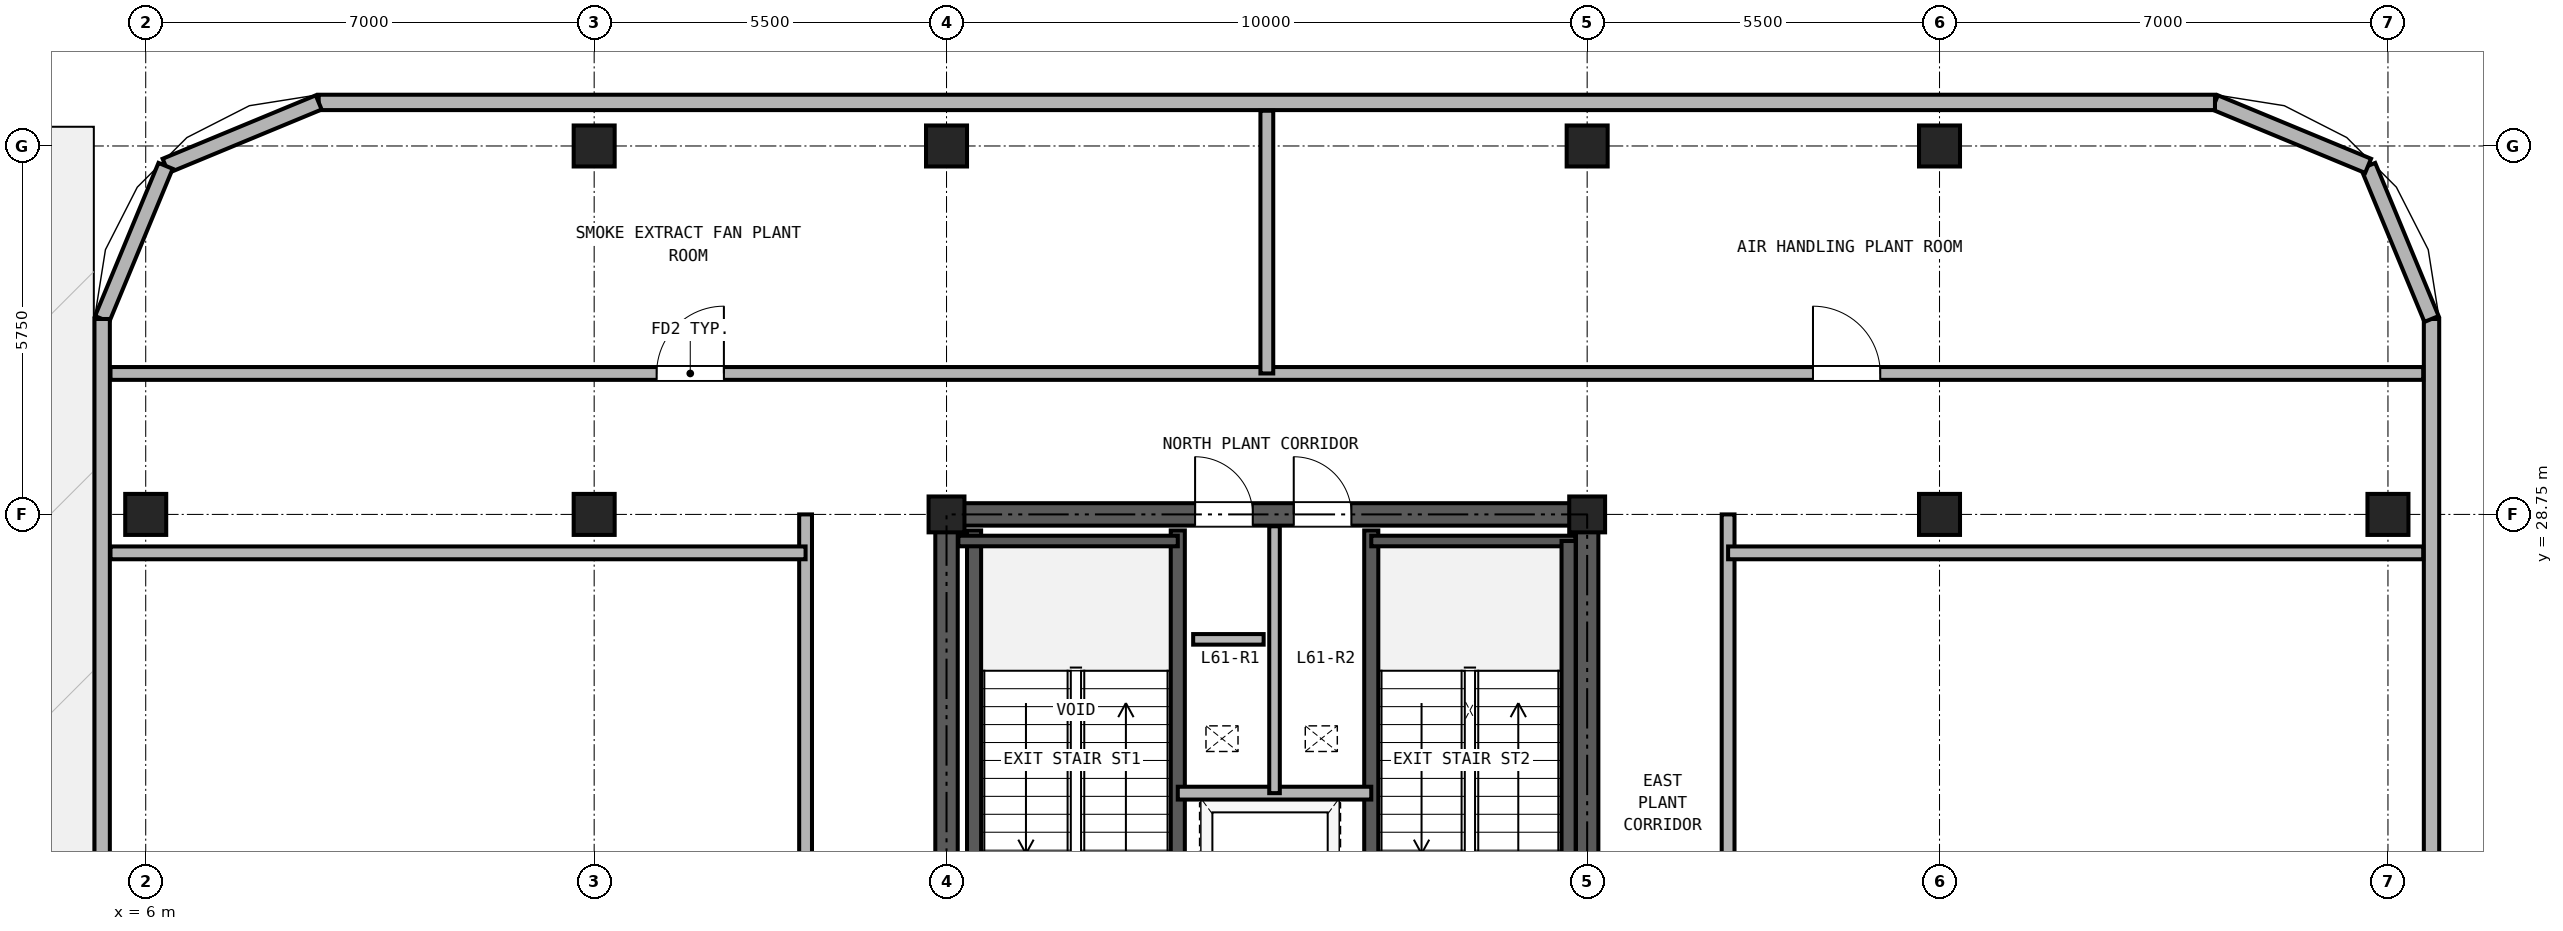
"""IFC4 building model, lengths in metres.
Left out: names, types, materials, properties, quantities, classifications, styles, units other than length and angle.
Written with IfcOpenShell. Run it as: python <this file> out.ifc"""

import sys

from ifc_helpers import new_model, si_unit, direction, frame, frame_2d, origin, origin_2d, place, context, subcontext, project, spatial, rectangle, hollow_rectangle, extrude, source, transform, mapped, element, fill, save


model = new_model("IFC4")
c1 = context("Model", 3, precision=1e-05, world=origin(), true_north=direction((0.0, 1.0)))
c2 = subcontext(c1, "Body", "Model", "MODEL_VIEW")
j1 = project(units=[si_unit("LENGTHUNIT", "METRE"), si_unit("PLANEANGLEUNIT", "RADIAN")], contexts=[c1])
p1 = place(None, origin())
s1 = spatial("IfcSite", under=j1, at=p1, CompositionType="ELEMENT")
p2 = place(p1, origin())
s2 = spatial("IfcBuilding", under=s1, at=p2, CompositionType="ELEMENT")
p3 = place(p2, frame((0.0, 0.0, 215.6)))
s3 = spatial("IfcBuildingStorey", under=s2, at=p3, CompositionType="ELEMENT", Elevation=215.6)
m1 = source(origin(), c2, "Body", "SweptSolid", [
    extrude(hollow_rectangle(XDim=0.64, YDim=0.64, WallThickness=0.035, at=origin_2d()), origin(), (0.0, 0.0, 1.0), 4.28),
])
for number, where, z_axis, x_axis in (
    (1, (13.0, 34.5, 0.0), (0.0, 0.0, 1.0), (1.0, 0.0, 0.0)),
    (2, (18.5, 34.5, 0.0), (0.0, 0.0, 1.0), (1.0, 0.0, 0.0)),
    (3, (28.5, 34.5, 0.0), (0.0, 0.0, 1.0), (1.0, 0.0, 0.0)),
    (4, (34.0, 34.5, 0.0), (0.0, 0.0, 1.0), (1.0, 0.0, 0.0)),
    (5, (6.0, 28.75, 0.0), (0.0, 0.0, 1.0), (1.0, 0.0, 0.0)),
    (6, (41.0, 28.75, 0.0), (0.0, 0.0, 1.0), (1.0, 0.0, 0.0)),
    (7, (13.0, 28.75, 0.0), (0.0, 0.0, 1.0), (1.0, 0.0, 0.0)),
):
    element("IfcColumn", number, at=place(p3, frame(where, z_axis=z_axis, x_axis=x_axis)), inside=s3, PredefinedType="COLUMN", context=c2, shape_type="MappedRepresentation", body=[
        mapped(m1, transform((0.0, 0.0, 0.0), x_axis=(1.0, 0.0, 0.0), y_axis=(0.0, 1.0, 0.0), z_axis=(0.0, 0.0, 1.0), scale=1.0)),
    ])
m2 = source(origin(), c2, "Body", "SweptSolid", [
    extrude(hollow_rectangle(XDim=0.56, YDim=0.56, WallThickness=0.03, at=origin_2d()), origin(), (0.0, 0.0, 1.0), 4.28),
])
for number, where, z_axis, x_axis in (
    (8, (18.5, 28.75, 0.0), (0.0, 0.0, 1.0), (1.0, 0.0, 0.0)),
    (9, (28.5, 28.75, 0.0), (0.0, 0.0, 1.0), (1.0, 0.0, 0.0)),
):
    element("IfcColumn", number, at=place(p3, frame(where, z_axis=z_axis, x_axis=x_axis)), inside=s3, PredefinedType="COLUMN", context=c2, shape_type="MappedRepresentation", body=[
        mapped(m2, transform((0.0, 0.0, 0.0), x_axis=(1.0, 0.0, 0.0), y_axis=(0.0, 1.0, 0.0), z_axis=(0.0, 0.0, 1.0), scale=1.0)),
    ])
p4 = place(p3, frame((34.0, 28.75, 0.0), z_axis=(0.0, 0.0, 1.0), x_axis=(1.0, 0.0, 0.0)))
e10 = element("IfcColumn", 10, at=p4, inside=s3, PredefinedType="COLUMN", context=c2, shape_type="MappedRepresentation", body=[
    mapped(m1, transform((0.0, 0.0, 0.0), x_axis=(1.0, 0.0, 0.0), y_axis=(0.0, 1.0, 0.0), z_axis=(0.0, 0.0, 1.0), scale=1.0)),
])
p5 = place(p3, frame((41.68, 3.5, 0.0), z_axis=(0.0, 0.0, 1.0), x_axis=(0.0, 1.0, 0.0)))
e11 = element("IfcWall", 11, at=p5, inside=s3, PredefinedType="SOLIDWALL", context=c2, shape_type="SweptSolid", body=[
    extrude(rectangle(XDim=28.3, YDim=0.24, at=frame_2d((14.15, 0.0))), origin(), (0.0, 0.0, 1.0), 4.28),
])
for number, where, z_axis, x_axis in (
    (12, (41.68, 31.8, 0.0), (0.0, 0.0, 1.0), (-0.383, 0.924, 0.0)),
    (13, (40.69, 34.19, 0.0), (0.0, 0.0, 1.0), (-0.924, 0.383, 0.0)),
):
    element("IfcWall", number, at=place(p3, frame(where, z_axis=z_axis, x_axis=x_axis)), inside=s3, PredefinedType="SOLIDWALL", context=c2, shape_type="SweptSolid", body=[
        extrude(rectangle(XDim=2.587, YDim=0.24, at=frame_2d((1.293, 0.0))), origin(), (0.0, 0.0, 1.0), 4.28),
    ])
p6 = place(p3, frame((38.3, 35.18, 0.0), z_axis=(0.0, 0.0, 1.0), x_axis=(-1.0, 0.0, 0.0)))
e14 = element("IfcWall", 14, at=p6, inside=s3, PredefinedType="SOLIDWALL", context=c2, shape_type="SweptSolid", body=[
    extrude(rectangle(XDim=29.6, YDim=0.24, at=frame_2d((14.8, 0.0))), origin(), (0.0, 0.0, 1.0), 4.28),
])
for number, where, z_axis, x_axis in (
    (15, (8.7, 35.18, 0.0), (0.0, 0.0, 1.0), (-0.924, -0.383, 0.0)),
    (16, (6.31, 34.19, 0.0), (0.0, 0.0, 1.0), (-0.383, -0.924, 0.0)),
):
    element("IfcWall", number, at=place(p3, frame(where, z_axis=z_axis, x_axis=x_axis)), inside=s3, PredefinedType="SOLIDWALL", context=c2, shape_type="SweptSolid", body=[
        extrude(rectangle(XDim=2.587, YDim=0.24, at=frame_2d((1.293, 0.0))), origin(), (0.0, 0.0, 1.0), 4.28),
    ])
p7 = place(p3, frame((5.32, 31.8, 0.0), z_axis=(0.0, 0.0, 1.0), x_axis=(0.0, -1.0, 0.0)))
e17 = element("IfcWall", 17, at=p7, inside=s3, PredefinedType="SOLIDWALL", context=c2, shape_type="SweptSolid", body=[
    extrude(rectangle(XDim=28.3, YDim=0.24, at=frame_2d((14.15, 0.0))), origin(), (0.0, 0.0, 1.0), 4.28),
])
p8 = place(p3, frame((18.325, 28.75, 0.0), z_axis=(0.0, 0.0, 1.0), x_axis=(1.0, 0.0, 0.0)))
e18 = element("IfcWall", 18, at=p8, inside=s3, PredefinedType="SHEAR", context=c2, shape_type="SweptSolid", body=[
    extrude(rectangle(XDim=10.35, YDim=0.35, at=frame_2d((5.175, 0.0))), origin(), (0.0, 0.0, 1.0), 4.28),
])
p9 = place(p8, frame((4.055, 0.0, 0.0)))
e19 = element("IfcOpeningElement", 19, at=p9, cuts=e18, PredefinedType="OPENING", context=c2, shape_type="SweptSolid", body=[
    extrude(rectangle(XDim=0.9, YDim=2.05, at=frame_2d((0.45, 1.025))), frame((0.0, 0.185, 0.0), z_axis=(0.0, -1.0, 0.0), x_axis=(1.0, 0.0, 0.0)), (0.0, 0.0, 1.0), 0.37),
])
p10 = place(p8, frame((5.595, 0.0, 0.0)))
e20 = element("IfcOpeningElement", 20, at=p10, cuts=e18, PredefinedType="OPENING", context=c2, shape_type="SweptSolid", body=[
    extrude(rectangle(XDim=0.9, YDim=2.05, at=frame_2d((0.45, 1.025))), frame((0.0, 0.185, 0.0), z_axis=(0.0, -1.0, 0.0), x_axis=(1.0, 0.0, 0.0)), (0.0, 0.0, 1.0), 0.37),
])
p11 = place(p3, frame((18.5, 11.675, 0.0), z_axis=(0.0, 0.0, 1.0), x_axis=(0.0, 1.0, 0.0)))
e21 = element("IfcWall", 21, at=p11, inside=s3, PredefinedType="SHEAR", context=c2, shape_type="SweptSolid", body=[
    extrude(rectangle(XDim=16.9, YDim=0.35, at=frame_2d((8.45, 0.0))), origin(), (0.0, 0.0, 1.0), 4.28),
])
p12 = place(p11, frame((7.475, 0.0, 0.0)))
e22 = element("IfcOpeningElement", 22, at=p12, cuts=e21, PredefinedType="OPENING", context=c2, shape_type="SweptSolid", body=[
    extrude(rectangle(XDim=1.15, YDim=2.2, at=frame_2d((0.575, 1.1))), frame((0.0, 0.185, 0.0), z_axis=(0.0, -1.0, 0.0), x_axis=(1.0, 0.0, 0.0)), (0.0, 0.0, 1.0), 0.37),
])
p13 = place(p3, frame((28.5, 11.675, 0.0), z_axis=(0.0, 0.0, 1.0), x_axis=(0.0, 1.0, 0.0)))
e23 = element("IfcWall", 23, at=p13, inside=s3, PredefinedType="SHEAR", context=c2, shape_type="SweptSolid", body=[
    extrude(rectangle(XDim=16.9, YDim=0.35, at=frame_2d((8.45, 0.0))), origin(), (0.0, 0.0, 1.0), 4.28),
])
p14 = place(p13, frame((7.475, 0.0, 0.0)))
e24 = element("IfcOpeningElement", 24, at=p14, cuts=e23, PredefinedType="OPENING", context=c2, shape_type="SweptSolid", body=[
    extrude(rectangle(XDim=1.15, YDim=2.2, at=frame_2d((0.575, 1.1))), frame((0.0, 0.185, 0.0), z_axis=(0.0, -1.0, 0.0), x_axis=(1.0, 0.0, 0.0)), (0.0, 0.0, 1.0), 0.37),
])
for number, where, z_axis, x_axis in (
    (25, (18.93, 21.39, 0.0), (0.0, 0.0, 1.0), (0.0, 1.0, 0.0)),
    (26, (22.11, 21.39, 0.0), (0.0, 0.0, 1.0), (0.0, 1.0, 0.0)),
    (27, (25.13, 21.39, 0.0), (0.0, 0.0, 1.0), (0.0, 1.0, 0.0)),
):
    element("IfcWall", number, at=place(p3, frame(where, z_axis=z_axis, x_axis=x_axis)), inside=s3, PredefinedType="SOLIDWALL", context=c2, shape_type="SweptSolid", body=[
        extrude(rectangle(XDim=7.11, YDim=0.22, at=frame_2d((3.555, 0.0))), origin(), (0.0, 0.0, 1.0), 4.28),
    ])
p15 = place(p3, frame((18.685, 28.335, 0.0), z_axis=(0.0, 0.0, 1.0), x_axis=(1.0, 0.0, 0.0)))
e28 = element("IfcWall", 28, at=p15, inside=s3, PredefinedType="PARTITIONING", context=c2, shape_type="SweptSolid", body=[
    extrude(rectangle(XDim=3.425, YDim=0.165, at=frame_2d((1.712, 0.0))), origin(), (0.0, 0.0, 1.0), 4.28),
])
p16 = place(p3, frame((25.13, 28.335, 0.0), z_axis=(0.0, 0.0, 1.0), x_axis=(1.0, 0.0, 0.0)))
e29 = element("IfcWall", 29, at=p16, inside=s3, PredefinedType="PARTITIONING", context=c2, shape_type="SweptSolid", body=[
    extrude(rectangle(XDim=3.185, YDim=0.165, at=frame_2d((1.593, 0.0))), origin(), (0.0, 0.0, 1.0), 4.28),
])
p17 = place(p3, frame((28.21, 21.39, 0.0), z_axis=(0.0, 0.0, 1.0), x_axis=(0.0, 1.0, 0.0)))
e30 = element("IfcWall", 30, at=p17, inside=s3, PredefinedType="SOLIDWALL", context=c2, shape_type="SweptSolid", body=[
    extrude(rectangle(XDim=6.945, YDim=0.22, at=frame_2d((3.473, 0.0))), origin(), (0.0, 0.0, 1.0), 4.28),
])
p18 = place(p3, frame((22.11, 24.4, 0.0), z_axis=(0.0, 0.0, 1.0), x_axis=(1.0, 0.0, 0.0)))
e31 = element("IfcWall", 31, at=p18, inside=s3, PredefinedType="PARTITIONING", context=c2, shape_type="SweptSolid", body=[
    extrude(rectangle(XDim=3.02, YDim=0.2, at=frame_2d((1.51, 0.0))), origin(), (0.0, 0.0, 1.0), 4.28),
])
p19 = place(p3, frame((23.62, 24.4, 0.0), z_axis=(0.0, 0.0, 1.0), x_axis=(0.0, 1.0, 0.0)))
e32 = element("IfcWall", 32, at=p19, inside=s3, PredefinedType="PARTITIONING", context=c2, shape_type="SweptSolid", body=[
    extrude(rectangle(XDim=4.165, YDim=0.165, at=frame_2d((2.083, 0.0))), origin(), (0.0, 0.0, 1.0), 4.28),
])
p20 = place(p3, frame((5.45, 30.95, 0.0), z_axis=(0.0, 0.0, 1.0), x_axis=(1.0, 0.0, 0.0)))
e33 = element("IfcWall", 33, at=p20, inside=s3, PredefinedType="PARTITIONING", context=c2, shape_type="SweptSolid", body=[
    extrude(rectangle(XDim=36.1, YDim=0.2, at=frame_2d((18.05, 0.0))), origin(), (0.0, 0.0, 1.0), 4.28),
])
p21 = place(p20, frame((8.525, 0.0, 0.0)))
e34 = element("IfcOpeningElement", 34, at=p21, cuts=e33, PredefinedType="OPENING", context=c2, shape_type="SweptSolid", body=[
    extrude(rectangle(XDim=1.05, YDim=2.15, at=frame_2d((0.525, 1.075))), frame((0.0, 0.11, 0.0), z_axis=(0.0, -1.0, 0.0), x_axis=(1.0, 0.0, 0.0)), (0.0, 0.0, 1.0), 0.22),
])
p22 = place(p20, frame((26.575, 0.0, 0.0)))
e35 = element("IfcOpeningElement", 35, at=p22, cuts=e33, PredefinedType="OPENING", context=c2, shape_type="SweptSolid", body=[
    extrude(rectangle(XDim=1.05, YDim=2.15, at=frame_2d((0.525, 1.075))), frame((0.0, 0.11, 0.0), z_axis=(0.0, -1.0, 0.0), x_axis=(1.0, 0.0, 0.0)), (0.0, 0.0, 1.0), 0.22),
])
p23 = place(p3, frame((16.3, 8.9, 0.0), z_axis=(0.0, 0.0, 1.0), x_axis=(0.0, 1.0, 0.0)))
e36 = element("IfcWall", 36, at=p23, inside=s3, PredefinedType="PARTITIONING", context=c2, shape_type="SweptSolid", body=[
    extrude(rectangle(XDim=19.85, YDim=0.2, at=frame_2d((9.925, 0.0))), origin(), (0.0, 0.0, 1.0), 4.28),
])
p24 = place(p23, frame((10.6, 0.0, 0.0)))
e37 = element("IfcOpeningElement", 37, at=p24, cuts=e36, PredefinedType="OPENING", context=c2, shape_type="SweptSolid", body=[
    extrude(rectangle(XDim=1.05, YDim=2.15, at=frame_2d((0.525, 1.075))), frame((0.0, 0.11, 0.0), z_axis=(0.0, -1.0, 0.0), x_axis=(1.0, 0.0, 0.0)), (0.0, 0.0, 1.0), 0.22),
])
p25 = place(p3, frame((30.7, 8.9, 0.0), z_axis=(0.0, 0.0, 1.0), x_axis=(0.0, 1.0, 0.0)))
e38 = element("IfcWall", 38, at=p25, inside=s3, PredefinedType="PARTITIONING", context=c2, shape_type="SweptSolid", body=[
    extrude(rectangle(XDim=19.85, YDim=0.2, at=frame_2d((9.925, 0.0))), origin(), (0.0, 0.0, 1.0), 4.28),
])
p26 = place(p25, frame((10.6, 0.0, 0.0)))
e39 = element("IfcOpeningElement", 39, at=p26, cuts=e38, PredefinedType="OPENING", context=c2, shape_type="SweptSolid", body=[
    extrude(rectangle(XDim=1.5, YDim=2.25, at=frame_2d((0.75, 1.125))), frame((0.0, 0.11, 0.0), z_axis=(0.0, -1.0, 0.0), x_axis=(1.0, 0.0, 0.0)), (0.0, 0.0, 1.0), 0.22),
])
p27 = place(p3, frame((23.5, 30.95, 0.0), z_axis=(0.0, 0.0, 1.0), x_axis=(0.0, 1.0, 0.0)))
e40 = element("IfcWall", 40, at=p27, inside=s3, PredefinedType="PARTITIONING", context=c2, shape_type="SweptSolid", body=[
    extrude(rectangle(XDim=4.1, YDim=0.2, at=frame_2d((2.05, 0.0))), origin(), (0.0, 0.0, 1.0), 4.28),
])
for number, where, z_axis, x_axis in (
    (41, (5.45, 28.15, 0.0), (0.0, 0.0, 1.0), (1.0, 0.0, 0.0)),
    (42, (30.7, 28.15, 0.0), (0.0, 0.0, 1.0), (1.0, 0.0, 0.0)),
):
    element("IfcWall", number, at=place(p3, frame(where, z_axis=z_axis, x_axis=x_axis)), inside=s3, PredefinedType="PARTITIONING", context=c2, shape_type="SweptSolid", body=[
        extrude(rectangle(XDim=10.85, YDim=0.2, at=frame_2d((5.425, 0.0))), origin(), (0.0, 0.0, 1.0), 4.28),
    ])
p28 = place(p3, frame((22.35, 26.8, 0.0), z_axis=(0.0, 0.0, 1.0), x_axis=(1.0, 0.0, 0.0)))
e43 = element("IfcWall", 43, at=p28, inside=s3, PredefinedType="PARTITIONING", context=c2, shape_type="SweptSolid", body=[
    extrude(rectangle(XDim=1.1, YDim=0.165, at=frame_2d((0.55, 0.0))), origin(), (0.0, 0.0, 1.0), 4.28),
])
p29 = place(p9, origin())
e44 = element("IfcDoor", 44, at=p29, inside=s3, OperationType="SINGLE_SWING_LEFT", PredefinedType="DOOR", context=c2, shape_type="SweptSolid", body=[
    extrude(rectangle(XDim=0.9, YDim=2.05, at=frame_2d((0.45, 1.025))), frame((0.0, 0.025, 0.0), z_axis=(0.0, -1.0, 0.0), x_axis=(1.0, 0.0, 0.0)), (0.0, 0.0, 1.0), 0.05),
])
fill(e19, e44)
p30 = place(p10, origin())
e45 = element("IfcDoor", 45, at=p30, inside=s3, OperationType="SINGLE_SWING_LEFT", PredefinedType="DOOR", context=c2, shape_type="SweptSolid", body=[
    extrude(rectangle(XDim=0.9, YDim=2.05, at=frame_2d((0.45, 1.025))), frame((0.0, 0.025, 0.0), z_axis=(0.0, -1.0, 0.0), x_axis=(1.0, 0.0, 0.0)), (0.0, 0.0, 1.0), 0.05),
])
fill(e20, e45)
p31 = place(p21, origin())
e46 = element("IfcDoor", 46, at=p31, inside=s3, OperationType="SINGLE_SWING_RIGHT", PredefinedType="DOOR", context=c2, shape_type="SweptSolid", body=[
    extrude(rectangle(XDim=1.05, YDim=2.15, at=frame_2d((0.525, 1.075))), frame((0.0, 0.025, 0.0), z_axis=(0.0, -1.0, 0.0), x_axis=(1.0, 0.0, 0.0)), (0.0, 0.0, 1.0), 0.05),
])
fill(e34, e46)
p32 = place(p22, origin())
e47 = element("IfcDoor", 47, at=p32, inside=s3, OperationType="SINGLE_SWING_LEFT", PredefinedType="DOOR", context=c2, shape_type="SweptSolid", body=[
    extrude(rectangle(XDim=1.05, YDim=2.15, at=frame_2d((0.525, 1.075))), frame((0.0, 0.025, 0.0), z_axis=(0.0, -1.0, 0.0), x_axis=(1.0, 0.0, 0.0)), (0.0, 0.0, 1.0), 0.05),
])
fill(e35, e47)
save(model, sys.argv[1])
